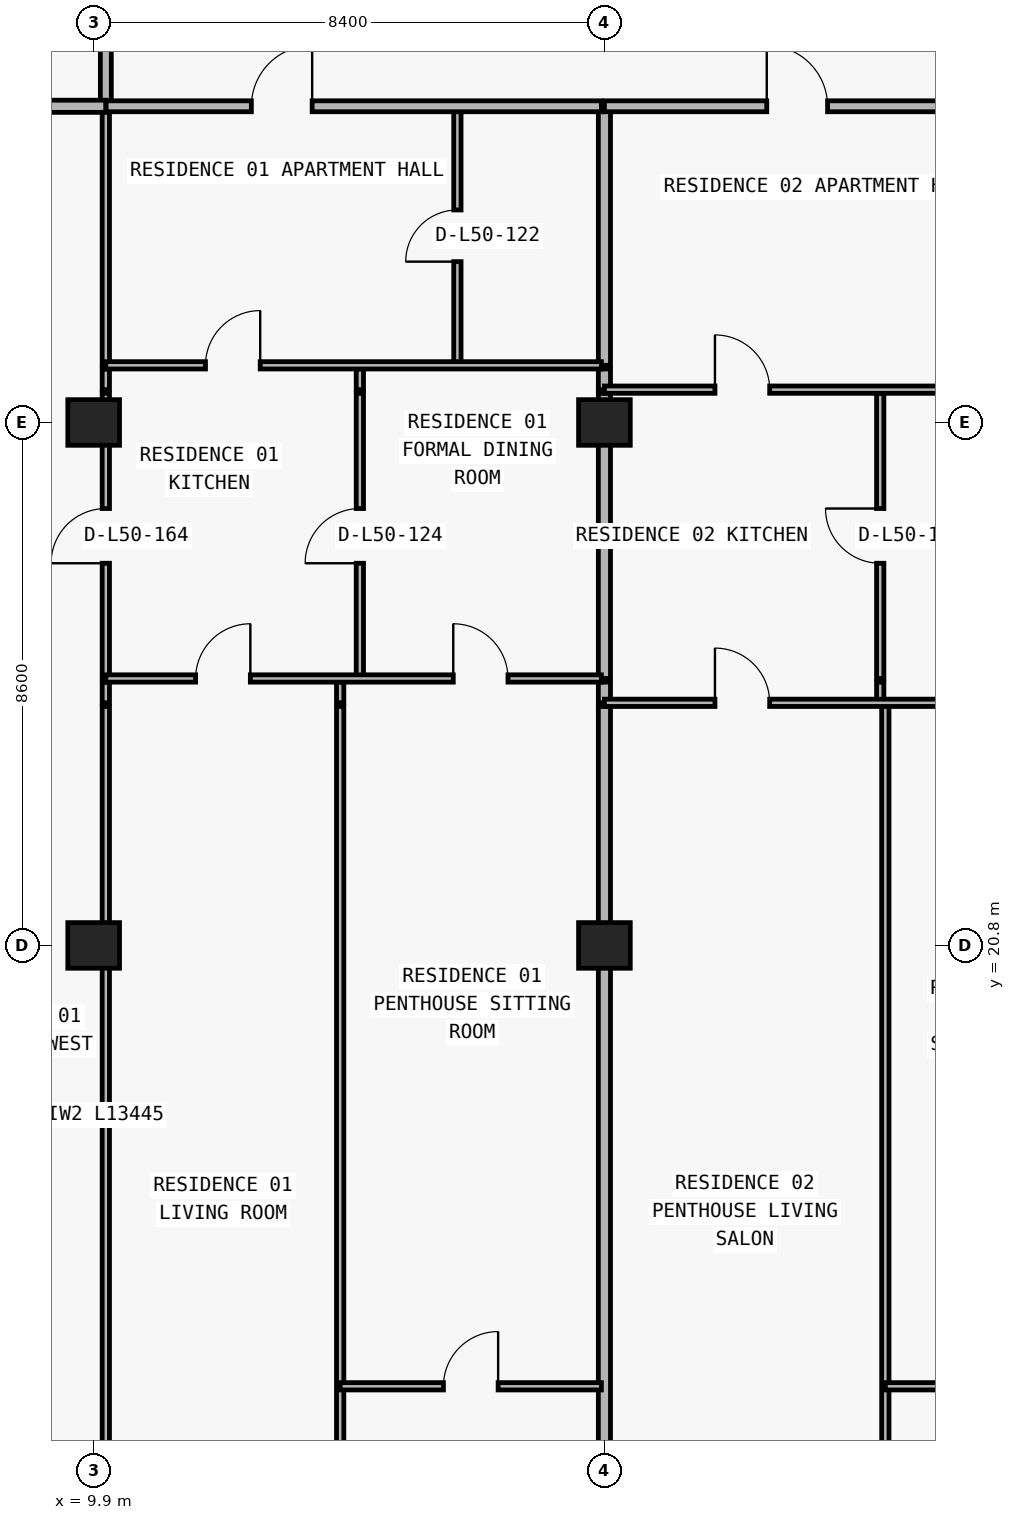
"""IFC4 building model, lengths in metres.
Left out: names, types, materials, properties, quantities, classifications, styles, units other than length and angle.
Written with IfcOpenShell. Run it as: python <this file> out.ifc"""

import sys

from ifc_helpers import new_model, si_unit, direction, frame, frame_2d, origin, origin_2d, place, context, subcontext, project, spatial, rectangle, extrude, element, fill, save


model = new_model("IFC4")
c1 = context("Model", 3, precision=1e-05, world=origin(), true_north=direction((0.0, 1.0)))
c2 = subcontext(c1, "Body", "Model", "MODEL_VIEW")
j1 = project(units=[si_unit("LENGTHUNIT", "METRE"), si_unit("PLANEANGLEUNIT", "RADIAN")], contexts=[c1])
p1 = place(None, origin())
s1 = spatial("IfcSite", under=j1, at=p1, CompositionType="ELEMENT")
p2 = place(p1, origin())
s2 = spatial("IfcBuilding", under=s1, at=p2, CompositionType="ELEMENT")
p3 = place(p2, frame((0.0, 0.0, 180.3)))
s3 = spatial("IfcBuildingStorey", under=s2, at=p3, CompositionType="ELEMENT", Elevation=180.3)
for number, where, z_axis, x_axis in (
    (1, (9.9, 20.8, 0.0), (0.0, 0.0, 1.0), (1.0, 0.0, 0.0)),
    (2, (18.3, 20.8, 0.0), (0.0, 0.0, 1.0), (1.0, 0.0, 0.0)),
    (3, (9.9, 29.4, 0.0), (0.0, 0.0, 1.0), (1.0, 0.0, 0.0)),
    (4, (18.3, 29.4, 0.0), (0.0, 0.0, 1.0), (1.0, 0.0, 0.0)),
):
    element("IfcColumn", number, at=place(p3, frame(where, z_axis=z_axis, x_axis=x_axis)), inside=s3, PredefinedType="COLUMN", context=c2, shape_type="SweptSolid", body=[
        extrude(rectangle(XDim=0.85, YDim=0.75, at=origin_2d()), origin(), (0.0, 0.0, 1.0), 3.0),
    ])
p4 = place(p3, frame((10.1, 11.285, 0.0), z_axis=(0.0, 0.0, 1.0), x_axis=(0.0, 1.0, 0.0)))
e5 = element("IfcWall", 5, at=p4, inside=s3, PredefinedType="PARTITIONING", context=c2, shape_type="SweptSolid", body=[
    extrude(rectangle(XDim=13.445, YDim=0.12, at=frame_2d((6.723, 0.0))), origin(), (0.0, 0.0, 1.0), 2.213),
])
p5 = place(p3, frame((10.1, 24.79, 0.0), z_axis=(0.0, 0.0, 1.0), x_axis=(0.0, 1.0, 0.0)))
e6 = element("IfcWall", 6, at=p5, inside=s3, PredefinedType="PARTITIONING", context=c2, shape_type="SweptSolid", body=[
    extrude(rectangle(XDim=0.34, YDim=0.12, at=frame_2d((0.17, 0.0))), origin(), (0.0, 0.0, 1.0), 2.213),
])
p6 = place(p3, frame((10.1, 25.19, 0.0), z_axis=(0.0, 0.0, 1.0), x_axis=(0.0, 1.0, 0.0)))
e7 = element("IfcWall", 7, at=p6, inside=s3, PredefinedType="PARTITIONING", context=c2, shape_type="SweptSolid", body=[
    extrude(rectangle(XDim=4.69, YDim=0.12, at=frame_2d((2.345, 0.0))), origin(), (0.0, 0.0, 1.0), 2.213),
])
p7 = place(p6, frame((1.895, 0.0, 0.0)))
e8 = element("IfcOpeningElement", 8, at=p7, cuts=e7, PredefinedType="OPENING", context=c2, shape_type="SweptSolid", body=[
    extrude(rectangle(XDim=0.9, YDim=2.15, at=frame_2d((0.45, 1.075))), frame((0.0, 0.07, 0.0), z_axis=(0.0, -1.0, 0.0), x_axis=(1.0, 0.0, 0.0)), (0.0, 0.0, 1.0), 0.14),
])
p8 = place(p3, frame((10.1, 29.94, 0.0), z_axis=(0.0, 0.0, 1.0), x_axis=(0.0, 1.0, 0.0)))
e9 = element("IfcWall", 9, at=p8, inside=s3, PredefinedType="PARTITIONING", context=c2, shape_type="SweptSolid", body=[
    extrude(rectangle(XDim=0.34, YDim=0.12, at=frame_2d((0.17, 0.0))), origin(), (0.0, 0.0, 1.0), 2.213),
])
p9 = place(p3, frame((10.1, 30.34, 0.0), z_axis=(0.0, 0.0, 1.0), x_axis=(0.0, 1.0, 0.0)))
e10 = element("IfcWall", 10, at=p9, inside=s3, PredefinedType="PARTITIONING", context=c2, shape_type="SweptSolid", body=[
    extrude(rectangle(XDim=4.26, YDim=0.12, at=frame_2d((2.13, 0.0))), origin(), (0.0, 0.0, 1.0), 2.213),
])
p10 = place(p3, frame((10.1, 34.605, 0.0), z_axis=(0.0, 0.0, 1.0), x_axis=(0.0, 1.0, 0.0)))
e11 = element("IfcWall", 11, at=p10, inside=s3, PredefinedType="PARTITIONING", context=c2, shape_type="SweptSolid", body=[
    extrude(rectangle(XDim=2.345, YDim=0.18, at=frame_2d((1.172, 0.0))), origin(), (0.0, 0.0, 1.0), 2.213),
])
p11 = place(p3, frame((13.954, 11.24, 0.0), z_axis=(0.0, 0.0, 1.0), x_axis=(0.0, 1.0, 0.0)))
e12 = element("IfcWall", 12, at=p11, inside=s3, PredefinedType="PARTITIONING", context=c2, shape_type="SweptSolid", body=[
    extrude(rectangle(XDim=13.49, YDim=0.12, at=frame_2d((6.745, 0.0))), origin(), (0.0, 0.0, 1.0), 3.0),
])
p12 = place(p3, frame((13.954, 24.79, 0.0), z_axis=(0.0, 0.0, 1.0), x_axis=(0.0, 1.0, 0.0)))
e13 = element("IfcWall", 13, at=p12, inside=s3, PredefinedType="PARTITIONING", context=c2, shape_type="SweptSolid", body=[
    extrude(rectangle(XDim=0.34, YDim=0.12, at=frame_2d((0.17, 0.0))), origin(), (0.0, 0.0, 1.0), 3.0),
])
p13 = place(p3, frame((14.278, 25.19, 0.0), z_axis=(0.0, 0.0, 1.0), x_axis=(0.0, 1.0, 0.0)))
e14 = element("IfcWall", 14, at=p13, inside=s3, PredefinedType="PARTITIONING", context=c2, shape_type="SweptSolid", body=[
    extrude(rectangle(XDim=4.69, YDim=0.12, at=frame_2d((2.345, 0.0))), origin(), (0.0, 0.0, 1.0), 3.0),
])
p14 = place(p13, frame((1.895, 0.0, 0.0)))
e15 = element("IfcOpeningElement", 15, at=p14, cuts=e14, PredefinedType="OPENING", context=c2, shape_type="SweptSolid", body=[
    extrude(rectangle(XDim=0.9, YDim=2.15, at=frame_2d((0.45, 1.075))), frame((0.0, 0.07, 0.0), z_axis=(0.0, -1.0, 0.0), x_axis=(1.0, 0.0, 0.0)), (0.0, 0.0, 1.0), 0.14),
])
p15 = place(p3, frame((14.278, 29.94, 0.0), z_axis=(0.0, 0.0, 1.0), x_axis=(0.0, 1.0, 0.0)))
e16 = element("IfcWall", 16, at=p15, inside=s3, PredefinedType="PARTITIONING", context=c2, shape_type="SweptSolid", body=[
    extrude(rectangle(XDim=0.34, YDim=0.12, at=frame_2d((0.17, 0.0))), origin(), (0.0, 0.0, 1.0), 3.0),
])
p16 = place(p3, frame((15.882, 30.34, 0.0), z_axis=(0.0, 0.0, 1.0), x_axis=(0.0, 1.0, 0.0)))
e17 = element("IfcWall", 17, at=p16, inside=s3, PredefinedType="PARTITIONING", context=c2, shape_type="SweptSolid", body=[
    extrude(rectangle(XDim=4.26, YDim=0.12, at=frame_2d((2.13, 0.0))), origin(), (0.0, 0.0, 1.0), 2.675),
])
p17 = place(p16, frame((1.705, 0.0, 0.0)))
e18 = element("IfcOpeningElement", 18, at=p17, cuts=e17, PredefinedType="OPENING", context=c2, shape_type="SweptSolid", body=[
    extrude(rectangle(XDim=0.85, YDim=2.1, at=frame_2d((0.425, 1.05))), frame((0.0, 0.07, 0.0), z_axis=(0.0, -1.0, 0.0), x_axis=(1.0, 0.0, 0.0)), (0.0, 0.0, 1.0), 0.14),
])
p18 = place(p3, frame((18.3, 11.24, 0.0), z_axis=(0.0, 0.0, 1.0), x_axis=(0.0, 1.0, 0.0)))
e19 = element("IfcWall", 19, at=p18, inside=s3, PredefinedType="PARTITIONING", context=c2, shape_type="SweptSolid", body=[
    extrude(rectangle(XDim=13.49, YDim=0.2, at=frame_2d((6.745, 0.0))), origin(), (0.0, 0.0, 1.0), 2.213),
])
p19 = place(p3, frame((18.3, 24.79, 0.0), z_axis=(0.0, 0.0, 1.0), x_axis=(0.0, 1.0, 0.0)))
e20 = element("IfcWall", 20, at=p19, inside=s3, PredefinedType="PARTITIONING", context=c2, shape_type="SweptSolid", body=[
    extrude(rectangle(XDim=0.34, YDim=0.2, at=frame_2d((0.17, 0.0))), origin(), (0.0, 0.0, 1.0), 2.213),
])
p20 = place(p3, frame((18.3, 25.19, 0.0), z_axis=(0.0, 0.0, 1.0), x_axis=(0.0, 1.0, 0.0)))
e21 = element("IfcWall", 21, at=p20, inside=s3, PredefinedType="PARTITIONING", context=c2, shape_type="SweptSolid", body=[
    extrude(rectangle(XDim=4.69, YDim=0.2, at=frame_2d((2.345, 0.0))), origin(), (0.0, 0.0, 1.0), 2.213),
])
p21 = place(p3, frame((18.3, 29.94, 0.0), z_axis=(0.0, 0.0, 1.0), x_axis=(0.0, 1.0, 0.0)))
e22 = element("IfcWall", 22, at=p21, inside=s3, PredefinedType="PARTITIONING", context=c2, shape_type="SweptSolid", body=[
    extrude(rectangle(XDim=0.34, YDim=0.2, at=frame_2d((0.17, 0.0))), origin(), (0.0, 0.0, 1.0), 2.213),
])
p22 = place(p3, frame((18.3, 30.34, 0.0), z_axis=(0.0, 0.0, 1.0), x_axis=(0.0, 1.0, 0.0)))
e23 = element("IfcWall", 23, at=p22, inside=s3, PredefinedType="PARTITIONING", context=c2, shape_type="SweptSolid", body=[
    extrude(rectangle(XDim=4.26, YDim=0.2, at=frame_2d((2.13, 0.0))), origin(), (0.0, 0.0, 1.0), 2.213),
])
p23 = place(p3, frame((22.836, 24.79, 0.0), z_axis=(0.0, 0.0, 1.0), x_axis=(0.0, 1.0, 0.0)))
e24 = element("IfcWall", 24, at=p23, inside=s3, PredefinedType="PARTITIONING", context=c2, shape_type="SweptSolid", body=[
    extrude(rectangle(XDim=0.34, YDim=0.12, at=frame_2d((0.17, 0.0))), origin(), (0.0, 0.0, 1.0), 3.0),
])
p24 = place(p3, frame((22.836, 25.19, 0.0), z_axis=(0.0, 0.0, 1.0), x_axis=(0.0, 1.0, 0.0)))
e25 = element("IfcWall", 25, at=p24, inside=s3, PredefinedType="PARTITIONING", context=c2, shape_type="SweptSolid", body=[
    extrude(rectangle(XDim=4.69, YDim=0.12, at=frame_2d((2.345, 0.0))), origin(), (0.0, 0.0, 1.0), 3.0),
])
p25 = place(p24, frame((1.895, 0.0, 0.0)))
e26 = element("IfcOpeningElement", 26, at=p25, cuts=e25, PredefinedType="OPENING", context=c2, shape_type="SweptSolid", body=[
    extrude(rectangle(XDim=0.9, YDim=2.15, at=frame_2d((0.45, 1.075))), frame((0.0, 0.07, 0.0), z_axis=(0.0, -1.0, 0.0), x_axis=(1.0, 0.0, 0.0)), (0.0, 0.0, 1.0), 0.14),
])
p26 = place(p3, frame((22.92, 11.24, 0.0), z_axis=(0.0, 0.0, 1.0), x_axis=(0.0, 1.0, 0.0)))
e27 = element("IfcWall", 27, at=p26, inside=s3, PredefinedType="PARTITIONING", context=c2, shape_type="SweptSolid", body=[
    extrude(rectangle(XDim=13.49, YDim=0.12, at=frame_2d((6.745, 0.0))), origin(), (0.0, 0.0, 1.0), 3.0),
])
p27 = place(p3, frame((13.954, 13.55, 0.0), z_axis=(0.0, 0.0, 1.0), x_axis=(1.0, 0.0, 0.0)))
e28 = element("IfcWall", 28, at=p27, inside=s3, PredefinedType="PARTITIONING", context=c2, shape_type="SweptSolid", body=[
    extrude(rectangle(XDim=4.296, YDim=0.12, at=frame_2d((2.148, 0.0))), origin(), (0.0, 0.0, 1.0), 3.0),
])
p28 = place(p27, frame((1.698, 0.0, 0.0)))
e29 = element("IfcOpeningElement", 29, at=p28, cuts=e28, PredefinedType="OPENING", context=c2, shape_type="SweptSolid", body=[
    extrude(rectangle(XDim=0.9, YDim=2.15, at=frame_2d((0.45, 1.075))), frame((0.0, 0.07, 0.0), z_axis=(0.0, -1.0, 0.0), x_axis=(1.0, 0.0, 0.0)), (0.0, 0.0, 1.0), 0.14),
])
p29 = place(p3, frame((22.92, 13.55, 0.0), z_axis=(0.0, 0.0, 1.0), x_axis=(1.0, 0.0, 0.0)))
e30 = element("IfcWall", 30, at=p29, inside=s3, PredefinedType="PARTITIONING", context=c2, shape_type="SweptSolid", body=[
    extrude(rectangle(XDim=3.78, YDim=0.12, at=frame_2d((1.89, 0.0))), origin(), (0.0, 0.0, 1.0), 3.0),
])
p30 = place(p29, frame((1.44, 0.0, 0.0)))
e31 = element("IfcOpeningElement", 31, at=p30, cuts=e30, PredefinedType="OPENING", context=c2, shape_type="SweptSolid", body=[
    extrude(rectangle(XDim=0.9, YDim=2.15, at=frame_2d((0.45, 1.075))), frame((0.0, 0.07, 0.0), z_axis=(0.0, -1.0, 0.0), x_axis=(1.0, 0.0, 0.0)), (0.0, 0.0, 1.0), 0.14),
])
p31 = place(p3, frame((18.3, 24.79, 0.0), z_axis=(0.0, 0.0, 1.0), x_axis=(1.0, 0.0, 0.0)))
e32 = element("IfcWall", 32, at=p31, inside=s3, PredefinedType="PARTITIONING", context=c2, shape_type="SweptSolid", body=[
    extrude(rectangle(XDim=8.18, YDim=0.12, at=frame_2d((4.09, 0.0))), origin(), (0.0, 0.0, 1.0), 3.0),
])
p32 = place(p31, frame((1.818, 0.0, 0.0)))
e33 = element("IfcOpeningElement", 33, at=p32, cuts=e32, PredefinedType="OPENING", context=c2, shape_type="SweptSolid", body=[
    extrude(rectangle(XDim=0.9, YDim=2.15, at=frame_2d((0.45, 1.075))), frame((0.0, 0.07, 0.0), z_axis=(0.0, -1.0, 0.0), x_axis=(1.0, 0.0, 0.0)), (0.0, 0.0, 1.0), 0.14),
])
p33 = place(p31, frame((5.95, 0.0, 0.0)))
e34 = element("IfcOpeningElement", 34, at=p33, cuts=e32, PredefinedType="OPENING", context=c2, shape_type="SweptSolid", body=[
    extrude(rectangle(XDim=0.9, YDim=2.15, at=frame_2d((0.45, 1.075))), frame((0.0, 0.07, 0.0), z_axis=(0.0, -1.0, 0.0), x_axis=(1.0, 0.0, 0.0)), (0.0, 0.0, 1.0), 0.14),
])
p34 = place(p3, frame((10.1, 25.19, 0.0), z_axis=(0.0, 0.0, 1.0), x_axis=(1.0, 0.0, 0.0)))
e35 = element("IfcWall", 35, at=p34, inside=s3, PredefinedType="PARTITIONING", context=c2, shape_type="SweptSolid", body=[
    extrude(rectangle(XDim=8.15, YDim=0.12, at=frame_2d((4.075, 0.0))), origin(), (0.0, 0.0, 1.0), 3.0),
])
p35 = place(p34, frame((1.477, 0.0, 0.0)))
e36 = element("IfcOpeningElement", 36, at=p35, cuts=e35, PredefinedType="OPENING", context=c2, shape_type="SweptSolid", body=[
    extrude(rectangle(XDim=0.9, YDim=2.15, at=frame_2d((0.45, 1.075))), frame((0.0, 0.07, 0.0), z_axis=(0.0, -1.0, 0.0), x_axis=(1.0, 0.0, 0.0)), (0.0, 0.0, 1.0), 0.14),
])
p36 = place(p34, frame((5.714, 0.0, 0.0)))
e37 = element("IfcOpeningElement", 37, at=p36, cuts=e35, PredefinedType="OPENING", context=c2, shape_type="SweptSolid", body=[
    extrude(rectangle(XDim=0.9, YDim=2.15, at=frame_2d((0.45, 1.075))), frame((0.0, 0.07, 0.0), z_axis=(0.0, -1.0, 0.0), x_axis=(1.0, 0.0, 0.0)), (0.0, 0.0, 1.0), 0.14),
])
p37 = place(p3, frame((18.3, 29.94, 0.0), z_axis=(0.0, 0.0, 1.0), x_axis=(1.0, 0.0, 0.0)))
e38 = element("IfcWall", 38, at=p37, inside=s3, PredefinedType="PARTITIONING", context=c2, shape_type="SweptSolid", body=[
    extrude(rectangle(XDim=8.4, YDim=0.12, at=frame_2d((4.2, 0.0))), origin(), (0.0, 0.0, 1.0), 3.0),
])
p38 = place(p37, frame((1.818, 0.0, 0.0)))
e39 = element("IfcOpeningElement", 39, at=p38, cuts=e38, PredefinedType="OPENING", context=c2, shape_type="SweptSolid", body=[
    extrude(rectangle(XDim=0.9, YDim=2.15, at=frame_2d((0.45, 1.075))), frame((0.0, 0.07, 0.0), z_axis=(0.0, -1.0, 0.0), x_axis=(1.0, 0.0, 0.0)), (0.0, 0.0, 1.0), 0.14),
])
p39 = place(p3, frame((10.1, 30.34, 0.0), z_axis=(0.0, 0.0, 1.0), x_axis=(1.0, 0.0, 0.0)))
e40 = element("IfcWall", 40, at=p39, inside=s3, PredefinedType="PARTITIONING", context=c2, shape_type="SweptSolid", body=[
    extrude(rectangle(XDim=8.15, YDim=0.12, at=frame_2d((4.075, 0.0))), origin(), (0.0, 0.0, 1.0), 3.0),
])
p40 = place(p39, frame((1.639, 0.0, 0.0)))
e41 = element("IfcOpeningElement", 41, at=p40, cuts=e40, PredefinedType="OPENING", context=c2, shape_type="SweptSolid", body=[
    extrude(rectangle(XDim=0.9, YDim=2.15, at=frame_2d((0.45, 1.075))), frame((0.0, 0.07, 0.0), z_axis=(0.0, -1.0, 0.0), x_axis=(1.0, 0.0, 0.0)), (0.0, 0.0, 1.0), 0.14),
])
p41 = place(p3, frame((6.395, 34.6, 0.0), z_axis=(0.0, 0.0, 1.0), x_axis=(1.0, 0.0, 0.0)))
e42 = element("IfcWall", 42, at=p41, inside=s3, PredefinedType="PARTITIONING", context=c2, shape_type="SweptSolid", body=[
    extrude(rectangle(XDim=3.705, YDim=0.2, at=frame_2d((1.853, 0.0))), origin(), (0.0, 0.0, 1.0), 3.0),
])
p42 = place(p3, frame((10.105, 34.6, 0.0), z_axis=(0.0, 0.0, 1.0), x_axis=(1.0, 0.0, 0.0)))
e43 = element("IfcWall", 43, at=p42, inside=s3, PredefinedType="PARTITIONING", context=c2, shape_type="SweptSolid", body=[
    extrude(rectangle(XDim=8.145, YDim=0.18, at=frame_2d((4.073, 0.0))), origin(), (0.0, 0.0, 1.0), 3.0),
])
p43 = place(p42, frame((2.388, 0.0, 0.0)))
e44 = element("IfcOpeningElement", 44, at=p43, cuts=e43, PredefinedType="OPENING", context=c2, shape_type="SweptSolid", body=[
    extrude(rectangle(XDim=1.0, YDim=2.2, at=frame_2d((0.5, 1.1))), frame((0.0, 0.1, 0.0), z_axis=(0.0, -1.0, 0.0), x_axis=(1.0, 0.0, 0.0)), (0.0, 0.0, 1.0), 0.2),
])
p44 = place(p3, frame((18.3, 34.6, 0.0), z_axis=(0.0, 0.0, 1.0), x_axis=(1.0, 0.0, 0.0)))
e45 = element("IfcWall", 45, at=p44, inside=s3, PredefinedType="PARTITIONING", context=c2, shape_type="SweptSolid", body=[
    extrude(rectangle(XDim=41.2, YDim=0.18, at=frame_2d((20.6, 0.0))), origin(), (0.0, 0.0, 1.0), 3.0),
])
p45 = place(p44, frame((2.67, 0.0, 0.0)))
e46 = element("IfcOpeningElement", 46, at=p45, cuts=e45, PredefinedType="OPENING", context=c2, shape_type="SweptSolid", body=[
    extrude(rectangle(XDim=1.0, YDim=2.2, at=frame_2d((0.5, 1.1))), frame((0.0, 0.1, 0.0), z_axis=(0.0, -1.0, 0.0), x_axis=(1.0, 0.0, 0.0)), (0.0, 0.0, 1.0), 0.2),
])
p46 = place(p44, frame((11.212, 0.0, 0.0)))
e47 = element("IfcOpeningElement", 47, at=p46, cuts=e45, PredefinedType="OPENING", context=c2, shape_type="SweptSolid", body=[
    extrude(rectangle(XDim=1.0, YDim=2.2, at=frame_2d((0.5, 1.1))), frame((0.0, 0.1, 0.0), z_axis=(0.0, -1.0, 0.0), x_axis=(1.0, 0.0, 0.0)), (0.0, 0.0, 1.0), 0.2),
])
p47 = place(p44, frame((35.483, 0.0, 0.0)))
e48 = element("IfcOpeningElement", 48, at=p47, cuts=e45, PredefinedType="OPENING", context=c2, shape_type="SweptSolid", body=[
    extrude(rectangle(XDim=1.0, YDim=2.2, at=frame_2d((0.5, 1.1))), frame((0.0, 0.1, 0.0), z_axis=(0.0, -1.0, 0.0), x_axis=(1.0, 0.0, 0.0)), (0.0, 0.0, 1.0), 0.2),
])
p48 = place(p43, origin())
e49 = element("IfcDoor", 49, at=p48, inside=s3, OperationType="SINGLE_SWING_RIGHT", PredefinedType="DOOR", context=c2, shape_type="SweptSolid", body=[
    extrude(rectangle(XDim=1.0, YDim=2.2, at=frame_2d((0.5, 1.1))), frame((0.0, 0.025, 0.0), z_axis=(0.0, -1.0, 0.0), x_axis=(1.0, 0.0, 0.0)), (0.0, 0.0, 1.0), 0.05),
])
fill(e44, e49)
p49 = place(p17, origin())
e50 = element("IfcDoor", 50, at=p49, inside=s3, OperationType="SINGLE_SWING_LEFT", PredefinedType="DOOR", context=c2, shape_type="SweptSolid", body=[
    extrude(rectangle(XDim=0.85, YDim=2.1, at=frame_2d((0.425, 1.05))), frame((0.0, 0.025, 0.0), z_axis=(0.0, -1.0, 0.0), x_axis=(1.0, 0.0, 0.0)), (0.0, 0.0, 1.0), 0.05),
])
fill(e18, e50)
p50 = place(p40, origin())
e51 = element("IfcDoor", 51, at=p50, inside=s3, OperationType="SINGLE_SWING_RIGHT", PredefinedType="DOOR", context=c2, shape_type="SweptSolid", body=[
    extrude(rectangle(XDim=0.9, YDim=2.15, at=frame_2d((0.45, 1.075))), frame((0.0, 0.025, 0.0), z_axis=(0.0, -1.0, 0.0), x_axis=(1.0, 0.0, 0.0)), (0.0, 0.0, 1.0), 0.05),
])
fill(e41, e51)
p51 = place(p14, origin())
e52 = element("IfcDoor", 52, at=p51, inside=s3, OperationType="SINGLE_SWING_LEFT", PredefinedType="DOOR", context=c2, shape_type="SweptSolid", body=[
    extrude(rectangle(XDim=0.9, YDim=2.15, at=frame_2d((0.45, 1.075))), frame((0.0, 0.025, 0.0), z_axis=(0.0, -1.0, 0.0), x_axis=(1.0, 0.0, 0.0)), (0.0, 0.0, 1.0), 0.05),
])
fill(e15, e52)
p52 = place(p35, origin())
e53 = element("IfcDoor", 53, at=p52, inside=s3, OperationType="SINGLE_SWING_RIGHT", PredefinedType="DOOR", context=c2, shape_type="SweptSolid", body=[
    extrude(rectangle(XDim=0.9, YDim=2.15, at=frame_2d((0.45, 1.075))), frame((0.0, 0.025, 0.0), z_axis=(0.0, -1.0, 0.0), x_axis=(1.0, 0.0, 0.0)), (0.0, 0.0, 1.0), 0.05),
])
fill(e36, e53)
p53 = place(p36, origin())
e54 = element("IfcDoor", 54, at=p53, inside=s3, OperationType="SINGLE_SWING_LEFT", PredefinedType="DOOR", context=c2, shape_type="SweptSolid", body=[
    extrude(rectangle(XDim=0.9, YDim=2.15, at=frame_2d((0.45, 1.075))), frame((0.0, 0.025, 0.0), z_axis=(0.0, -1.0, 0.0), x_axis=(1.0, 0.0, 0.0)), (0.0, 0.0, 1.0), 0.05),
])
fill(e37, e54)
p54 = place(p28, origin())
e55 = element("IfcDoor", 55, at=p54, inside=s3, OperationType="SINGLE_SWING_RIGHT", PredefinedType="DOOR", context=c2, shape_type="SweptSolid", body=[
    extrude(rectangle(XDim=0.9, YDim=2.15, at=frame_2d((0.45, 1.075))), frame((0.0, 0.025, 0.0), z_axis=(0.0, -1.0, 0.0), x_axis=(1.0, 0.0, 0.0)), (0.0, 0.0, 1.0), 0.05),
])
fill(e29, e55)
p55 = place(p45, origin())
e56 = element("IfcDoor", 56, at=p55, inside=s3, OperationType="SINGLE_SWING_LEFT", PredefinedType="DOOR", context=c2, shape_type="SweptSolid", body=[
    extrude(rectangle(XDim=1.0, YDim=2.2, at=frame_2d((0.5, 1.1))), frame((0.0, 0.025, 0.0), z_axis=(0.0, -1.0, 0.0), x_axis=(1.0, 0.0, 0.0)), (0.0, 0.0, 1.0), 0.05),
])
fill(e46, e56)
p56 = place(p38, origin())
e57 = element("IfcDoor", 57, at=p56, inside=s3, OperationType="SINGLE_SWING_LEFT", PredefinedType="DOOR", context=c2, shape_type="SweptSolid", body=[
    extrude(rectangle(XDim=0.9, YDim=2.15, at=frame_2d((0.45, 1.075))), frame((0.0, 0.025, 0.0), z_axis=(0.0, -1.0, 0.0), x_axis=(1.0, 0.0, 0.0)), (0.0, 0.0, 1.0), 0.05),
])
fill(e39, e57)
p57 = place(p25, origin())
e58 = element("IfcDoor", 58, at=p57, inside=s3, OperationType="SINGLE_SWING_RIGHT", PredefinedType="DOOR", context=c2, shape_type="SweptSolid", body=[
    extrude(rectangle(XDim=0.9, YDim=2.15, at=frame_2d((0.45, 1.075))), frame((0.0, 0.025, 0.0), z_axis=(0.0, -1.0, 0.0), x_axis=(1.0, 0.0, 0.0)), (0.0, 0.0, 1.0), 0.05),
])
fill(e26, e58)
p58 = place(p32, origin())
e59 = element("IfcDoor", 59, at=p58, inside=s3, OperationType="SINGLE_SWING_LEFT", PredefinedType="DOOR", context=c2, shape_type="SweptSolid", body=[
    extrude(rectangle(XDim=0.9, YDim=2.15, at=frame_2d((0.45, 1.075))), frame((0.0, 0.025, 0.0), z_axis=(0.0, -1.0, 0.0), x_axis=(1.0, 0.0, 0.0)), (0.0, 0.0, 1.0), 0.05),
])
fill(e33, e59)
p59 = place(p7, origin())
e60 = element("IfcDoor", 60, at=p59, inside=s3, OperationType="SINGLE_SWING_LEFT", PredefinedType="DOOR", context=c2, shape_type="SweptSolid", body=[
    extrude(rectangle(XDim=0.9, YDim=2.15, at=frame_2d((0.45, 1.075))), frame((0.0, 0.025, 0.0), z_axis=(0.0, -1.0, 0.0), x_axis=(1.0, 0.0, 0.0)), (0.0, 0.0, 1.0), 0.05),
])
fill(e8, e60)
save(model, sys.argv[1])
